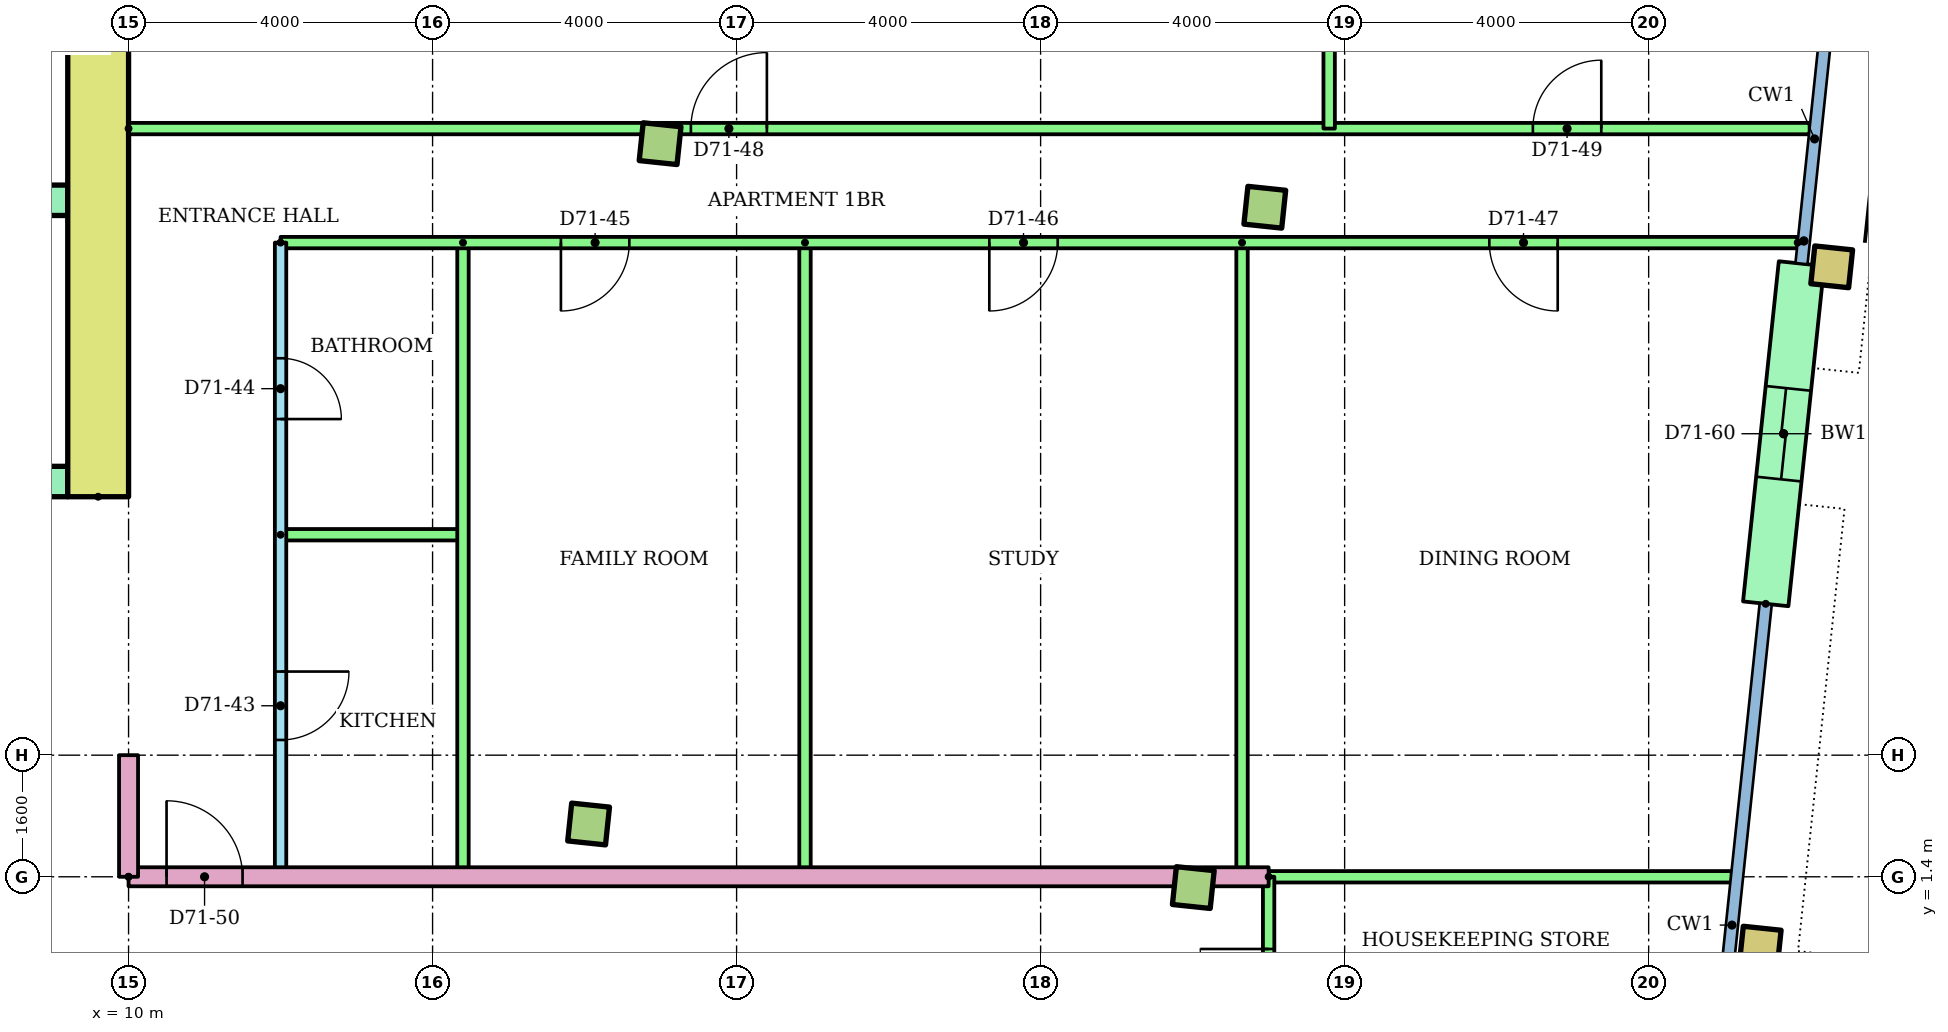
"""IFC4 building model, lengths in metres.
Left out: names, types, materials, properties, quantities, classifications, styles, units other than length and angle.
Written with IfcOpenShell. Run it as: python <this file> out.ifc"""

import sys

from ifc_helpers import new_model, si_unit, direction, frame, frame_2d, origin, origin_2d, place, context, subcontext, project, spatial, rectangle, hollow_rectangle, extrude, element, fill, save


model = new_model("IFC4")
c1 = context("Model", 3, precision=1e-05, world=origin(), true_north=direction((0.0, 1.0)))
c2 = subcontext(c1, "Body", "Model", "MODEL_VIEW")
j1 = project(units=[si_unit("LENGTHUNIT", "METRE"), si_unit("PLANEANGLEUNIT", "RADIAN")], contexts=[c1])
p1 = place(None, origin())
s1 = spatial("IfcSite", under=j1, at=p1, CompositionType="ELEMENT")
p2 = place(p1, origin())
s2 = spatial("IfcBuilding", under=s1, at=p2, CompositionType="ELEMENT")
p3 = place(p2, frame((0.0, 0.0, 272.3)))
s3 = spatial("IfcBuildingStorey", under=s2, at=p3, CompositionType="ELEMENT", Elevation=272.3)
for number, where, z_axis, x_axis in (
    (1, (16.053, 2.094, 0.0), (0.0, 0.0, 1.0), (0.995, -0.105, 0.0)),
    (2, (24.009, 1.258, 0.0), (0.0, 0.0, 1.0), (0.995, -0.105, 0.0)),
):
    element("IfcColumn", number, at=place(p3, frame(where, z_axis=z_axis, x_axis=x_axis)), inside=s3, PredefinedType="COLUMN", context=c2, shape_type="SweptSolid", body=[
        extrude(rectangle(XDim=0.5, YDim=0.5, at=origin_2d()), origin(), (0.0, 0.0, 1.0), 3.2),
    ])
p4 = place(p3, frame((31.468, 0.474, 0.0), z_axis=(0.0, 0.0, 1.0), x_axis=(0.994521895368, -0.104528463268, 0.0)))
e3 = element("IfcColumn", 3, at=p4, inside=s3, PredefinedType="COLUMN", context=c2, shape_type="SweptSolid", body=[
    extrude(hollow_rectangle(XDim=0.5, YDim=0.5, WallThickness=0.025, at=origin_2d()), origin(), (0.0, 0.0, 1.0), 3.2),
])
for number, where, z_axis, x_axis in (
    (4, (16.993, 11.045, 0.0), (0.0, 0.0, 1.0), (0.995, -0.105, 0.0)),
    (5, (24.95, 10.209, 0.0), (0.0, 0.0, 1.0), (0.995, -0.105, 0.0)),
):
    element("IfcColumn", number, at=place(p3, frame(where, z_axis=z_axis, x_axis=x_axis)), inside=s3, PredefinedType="COLUMN", context=c2, shape_type="SweptSolid", body=[
        extrude(rectangle(XDim=0.5, YDim=0.5, at=origin_2d()), origin(), (0.0, 0.0, 1.0), 3.2),
    ])
p5 = place(p3, frame((32.409, 9.425, 0.0), z_axis=(0.0, 0.0, 1.0), x_axis=(0.994521895368, -0.104528463268, 0.0)))
e6 = element("IfcColumn", 6, at=p5, inside=s3, PredefinedType="COLUMN", context=c2, shape_type="SweptSolid", body=[
    extrude(hollow_rectangle(XDim=0.5, YDim=0.5, WallThickness=0.025, at=origin_2d()), origin(), (0.0, 0.0, 1.0), 3.2),
])
p6 = place(p3, frame((31.54, 4.991, 0.0), z_axis=(0.0, 0.0, 1.0), x_axis=(0.104546400045, 0.994520009974, 0.0)))
e7 = element("IfcWall", 7, at=p6, inside=s3, PredefinedType="STANDARD", context=c2, shape_type="SweptSolid", body=[
    extrude(rectangle(XDim=4.5, YDim=0.6, at=frame_2d((2.25, 0.0))), origin(), (0.0, 0.0, 1.0), 2.92),
])
p7 = place(p6, frame((1.65, 0.0, 0.0)))
e8 = element("IfcOpeningElement", 8, at=p7, cuts=e7, PredefinedType="OPENING", context=c2, shape_type="SweptSolid", body=[
    extrude(rectangle(XDim=1.2, YDim=2.1, at=frame_2d((0.6, 1.05))), frame((0.0, 0.31, 0.0), z_axis=(0.0, -1.0, 0.0), x_axis=(1.0, 0.0, 0.0)), (0.0, 0.0, 1.0), 0.62),
])
p8 = place(p3, frame((9.6, 6.4, 0.0), z_axis=(0.0, 0.0, 1.0), x_axis=(0.0, 1.0, 0.0)))
e9 = element("IfcWall", 9, at=p8, inside=s3, PredefinedType="SHEAR", context=c2, shape_type="SweptSolid", body=[
    extrude(rectangle(XDim=13.6, YDim=0.8, at=frame_2d((6.8, 0.0))), origin(), (0.0, 0.0, 1.0), 2.92),
])
p9 = place(p3, frame((-9.2, 6.6, 0.0)))
e10 = element("IfcWall", 10, at=p9, inside=s3, PredefinedType="SHEAR", context=c2, shape_type="SweptSolid", body=[
    extrude(rectangle(XDim=18.4, YDim=0.4, at=frame_2d((9.2, 0.0))), origin(), (0.0, 0.0, 1.0), 2.92),
])
p10 = place(p9, frame((8.3, 0.0, 0.0)))
e11 = element("IfcOpeningElement", 11, at=p10, cuts=e10, PredefinedType="OPENING", context=c2, shape_type="SweptSolid", body=[
    extrude(rectangle(XDim=1.8, YDim=2.1, at=frame_2d((0.9, 1.05))), frame((0.0, 0.21, 0.0), z_axis=(0.0, -1.0, 0.0), x_axis=(1.0, 0.0, 0.0)), (0.0, 0.0, 1.0), 0.42),
])
p11 = place(p9, frame((3.8, 0.0, 0.0)))
e12 = element("IfcOpeningElement", 12, at=p11, cuts=e10, PredefinedType="OPENING", context=c2, shape_type="SweptSolid", body=[
    extrude(rectangle(XDim=1.8, YDim=2.1, at=frame_2d((0.9, 1.05))), frame((0.0, 0.21, 0.0), z_axis=(0.0, -1.0, 0.0), x_axis=(1.0, 0.0, 0.0)), (0.0, 0.0, 1.0), 0.42),
])
p12 = place(p9, frame((12.8, 0.0, 0.0)))
e13 = element("IfcOpeningElement", 13, at=p12, cuts=e10, PredefinedType="OPENING", context=c2, shape_type="SweptSolid", body=[
    extrude(rectangle(XDim=1.8, YDim=2.1, at=frame_2d((0.9, 1.05))), frame((0.0, 0.21, 0.0), z_axis=(0.0, -1.0, 0.0), x_axis=(1.0, 0.0, 0.0)), (0.0, 0.0, 1.0), 0.42),
])
p13 = place(p3, frame((1.2, 10.3, 0.0)))
e14 = element("IfcWall", 14, at=p13, inside=s3, PredefinedType="SHEAR", context=c2, shape_type="SweptSolid", body=[
    extrude(rectangle(XDim=8.0, YDim=0.4, at=frame_2d((4.0, 0.0))), origin(), (0.0, 0.0, 1.0), 2.92),
])
p14 = place(p13, frame((0.817, 0.0, 0.0)))
e15 = element("IfcOpeningElement", 15, at=p14, cuts=e14, PredefinedType="OPENING", context=c2, shape_type="SweptSolid", body=[
    extrude(rectangle(XDim=1.1, YDim=2.1, at=frame_2d((0.55, 1.05))), frame((0.0, 0.21, 0.0), z_axis=(0.0, -1.0, 0.0), x_axis=(1.0, 0.0, 0.0)), (0.0, 0.0, 1.0), 0.42),
])
p15 = place(p13, frame((3.55, 0.0, 0.0)))
e16 = element("IfcOpeningElement", 16, at=p15, cuts=e14, PredefinedType="OPENING", context=c2, shape_type="SweptSolid", body=[
    extrude(rectangle(XDim=1.1, YDim=2.1, at=frame_2d((0.55, 1.05))), frame((0.0, 0.21, 0.0), z_axis=(0.0, -1.0, 0.0), x_axis=(1.0, 0.0, 0.0)), (0.0, 0.0, 1.0), 0.42),
])
p16 = place(p13, frame((6.283, 0.0, 0.0)))
e17 = element("IfcOpeningElement", 17, at=p16, cuts=e14, PredefinedType="OPENING", context=c2, shape_type="SweptSolid", body=[
    extrude(rectangle(XDim=1.1, YDim=2.1, at=frame_2d((0.55, 1.05))), frame((0.0, 0.21, 0.0), z_axis=(0.0, -1.0, 0.0), x_axis=(1.0, 0.0, 0.0)), (0.0, 0.0, 1.0), 0.42),
])
p17 = place(p3, frame((12.0, 9.743, 0.0), z_axis=(0.0, 0.0, 1.0), x_axis=(0.0, -1.0, 0.0)))
e18 = element("IfcWall", 18, at=p17, inside=s3, PredefinedType="PARTITIONING", context=c2, shape_type="SweptSolid", body=[
    extrude(rectangle(XDim=8.344, YDim=0.15, at=frame_2d((4.172, 0.0))), origin(), (0.0, 0.0, 1.0), 2.4),
])
p18 = place(p17, frame((5.643, 0.0, 0.0)))
e19 = element("IfcOpeningElement", 19, at=p18, cuts=e18, PredefinedType="OPENING", context=c2, shape_type="SweptSolid", body=[
    extrude(rectangle(XDim=0.9, YDim=2.1, at=frame_2d((0.45, 1.05))), frame((0.0, 0.085, 0.0), z_axis=(0.0, -1.0, 0.0), x_axis=(1.0, 0.0, 0.0)), (0.0, 0.0, 1.0), 0.17),
])
p19 = place(p17, frame((1.522, 0.0, 0.0)))
e20 = element("IfcOpeningElement", 20, at=p19, cuts=e18, PredefinedType="OPENING", context=c2, shape_type="SweptSolid", body=[
    extrude(rectangle(XDim=0.8, YDim=2.1, at=frame_2d((0.4, 1.05))), frame((0.0, 0.085, 0.0), z_axis=(0.0, -1.0, 0.0), x_axis=(1.0, 0.0, 0.0)), (0.0, 0.0, 1.0), 0.17),
])
p20 = place(p3, frame((12.0, 5.9, 0.0)))
e21 = element("IfcWall", 21, at=p20, inside=s3, PredefinedType="PARTITIONING", context=c2, shape_type="SweptSolid", body=[
    extrude(rectangle(XDim=2.4, YDim=0.15, at=frame_2d((1.2, 0.0))), origin(), (0.0, 0.0, 1.0), 2.4),
])
for number, where, z_axis, x_axis in (
    (22, (14.4, 9.743, 0.0), (0.0, 0.0, 1.0), (0.0, -1.0, 0.0)),
    (23, (18.9, 9.743, 0.0), (0.0, 0.0, 1.0), (0.0, -1.0, 0.0)),
    (24, (24.65, 9.743, 0.0), (0.0, 0.0, 1.0), (0.0, -1.0, 0.0)),
):
    element("IfcWall", number, at=place(p3, frame(where, z_axis=z_axis, x_axis=x_axis)), inside=s3, PredefinedType="PARTITIONING", context=c2, shape_type="SweptSolid", body=[
        extrude(rectangle(XDim=8.344, YDim=0.15, at=frame_2d((4.172, 0.0))), origin(), (0.0, 0.0, 1.0), 2.4),
    ])
p21 = place(p3, frame((31.96, 9.743, 0.0), z_axis=(0.0, 0.0, 1.0), x_axis=(-1.0, 0.0, 0.0)))
e25 = element("IfcWall", 25, at=p21, inside=s3, PredefinedType="PARTITIONING", context=c2, shape_type="SweptSolid", body=[
    extrude(rectangle(XDim=19.96, YDim=0.15, at=frame_2d((9.98, 0.0))), origin(), (0.0, 0.0, 1.0), 2.4),
])
p22 = place(p21, frame((15.372, 0.0, 0.0)))
e26 = element("IfcOpeningElement", 26, at=p22, cuts=e25, PredefinedType="OPENING", context=c2, shape_type="SweptSolid", body=[
    extrude(rectangle(XDim=0.9, YDim=2.1, at=frame_2d((0.45, 1.05))), frame((0.0, 0.085, 0.0), z_axis=(0.0, -1.0, 0.0), x_axis=(1.0, 0.0, 0.0)), (0.0, 0.0, 1.0), 0.17),
])
p23 = place(p21, frame((9.735, 0.0, 0.0)))
e27 = element("IfcOpeningElement", 27, at=p23, cuts=e25, PredefinedType="OPENING", context=c2, shape_type="SweptSolid", body=[
    extrude(rectangle(XDim=0.9, YDim=2.1, at=frame_2d((0.45, 1.05))), frame((0.0, 0.085, 0.0), z_axis=(0.0, -1.0, 0.0), x_axis=(1.0, 0.0, 0.0)), (0.0, 0.0, 1.0), 0.17),
])
p24 = place(p21, frame((3.157, 0.0, 0.0)))
e28 = element("IfcOpeningElement", 28, at=p24, cuts=e25, PredefinedType="OPENING", context=c2, shape_type="SweptSolid", body=[
    extrude(rectangle(XDim=0.9, YDim=2.1, at=frame_2d((0.45, 1.05))), frame((0.0, 0.085, 0.0), z_axis=(0.0, -1.0, 0.0), x_axis=(1.0, 0.0, 0.0)), (0.0, 0.0, 1.0), 0.17),
])
p25 = place(p3, frame((10.0, 11.243, 0.0)))
e29 = element("IfcWall", 29, at=p25, inside=s3, PredefinedType="PARTITIONING", context=c2, shape_type="SweptSolid", body=[
    extrude(rectangle(XDim=22.118, YDim=0.15, at=frame_2d((11.059, 0.0))), origin(), (0.0, 0.0, 1.0), 2.4),
])
p26 = place(p25, frame((7.398, 0.0, 0.0)))
e30 = element("IfcOpeningElement", 30, at=p26, cuts=e29, PredefinedType="OPENING", context=c2, shape_type="SweptSolid", body=[
    extrude(rectangle(XDim=1.0, YDim=2.1, at=frame_2d((0.5, 1.05))), frame((0.0, 0.085, 0.0), z_axis=(0.0, -1.0, 0.0), x_axis=(1.0, 0.0, 0.0)), (0.0, 0.0, 1.0), 0.17),
])
p27 = place(p25, frame((18.477, 0.0, 0.0)))
e31 = element("IfcOpeningElement", 31, at=p27, cuts=e29, PredefinedType="OPENING", context=c2, shape_type="SweptSolid", body=[
    extrude(rectangle(XDim=0.9, YDim=2.1, at=frame_2d((0.45, 1.05))), frame((0.0, 0.085, 0.0), z_axis=(0.0, -1.0, 0.0), x_axis=(1.0, 0.0, 0.0)), (0.0, 0.0, 1.0), 0.17),
])
p28 = place(p3, frame((25.796, 18.185, 0.0), z_axis=(0.0, 0.0, 1.0), x_axis=(0.0, -1.0, 0.0)))
e32 = element("IfcWall", 32, at=p28, inside=s3, PredefinedType="PARTITIONING", context=c2, shape_type="SweptSolid", body=[
    extrude(rectangle(XDim=6.941, YDim=0.15, at=frame_2d((3.471, 0.0))), origin(), (0.0, 0.0, 1.0), 2.4),
])
p29 = place(p3, frame((10.0, 1.4, 0.0)))
e33 = element("IfcWall", 33, at=p29, inside=s3, PredefinedType="PARTITIONING", context=c2, shape_type="SweptSolid", body=[
    extrude(rectangle(XDim=15.0, YDim=0.25, at=frame_2d((7.5, 0.0))), origin(), (0.0, 0.0, 1.0), 2.4),
])
p30 = place(p29, frame((0.5, 0.0, 0.0)))
e34 = element("IfcOpeningElement", 34, at=p30, cuts=e33, PredefinedType="OPENING", context=c2, shape_type="SweptSolid", body=[
    extrude(rectangle(XDim=1.0, YDim=2.1, at=frame_2d((0.5, 1.05))), frame((0.0, 0.135, 0.0), z_axis=(0.0, -1.0, 0.0), x_axis=(1.0, 0.0, 0.0)), (0.0, 0.0, 1.0), 0.27),
])
p31 = place(p3, frame((25.0, 1.4, 0.0)))
e35 = element("IfcWall", 35, at=p31, inside=s3, PredefinedType="PARTITIONING", context=c2, shape_type="SweptSolid", body=[
    extrude(rectangle(XDim=6.093, YDim=0.15, at=frame_2d((3.046, 0.0))), origin(), (0.0, 0.0, 1.0), 2.4),
])
p32 = place(p3, frame((25.0, -1.4, 0.0), z_axis=(0.0, 0.0, 1.0), x_axis=(0.0, 1.0, 0.0)))
e36 = element("IfcWall", 36, at=p32, inside=s3, PredefinedType="PARTITIONING", context=c2, shape_type="SweptSolid", body=[
    extrude(rectangle(XDim=2.8, YDim=0.15, at=frame_2d((1.4, 0.0))), origin(), (0.0, 0.0, 1.0), 2.4),
])
p33 = place(p32, frame((0.95, 0.0, 0.0)))
e37 = element("IfcOpeningElement", 37, at=p33, cuts=e36, PredefinedType="OPENING", context=c2, shape_type="SweptSolid", body=[
    extrude(rectangle(XDim=0.9, YDim=2.1, at=frame_2d((0.45, 1.05))), frame((0.0, 0.085, 0.0), z_axis=(0.0, -1.0, 0.0), x_axis=(1.0, 0.0, 0.0)), (0.0, 0.0, 1.0), 0.17),
])
p34 = place(p3, frame((10.0, 1.4, 0.0), z_axis=(0.0, 0.0, 1.0), x_axis=(0.0, 1.0, 0.0)))
e38 = element("IfcWall", 38, at=p34, inside=s3, PredefinedType="PARTITIONING", context=c2, shape_type="SweptSolid", body=[
    extrude(rectangle(XDim=1.6, YDim=0.25, at=frame_2d((0.8, 0.0))), origin(), (0.0, 0.0, 1.0), 2.4),
])
p35 = place(p18, origin())
e39 = element("IfcDoor", 39, at=p35, inside=s3, OperationType="SINGLE_SWING_LEFT", PredefinedType="DOOR", context=c2, shape_type="SweptSolid", body=[
    extrude(rectangle(XDim=0.9, YDim=2.1, at=frame_2d((0.45, 1.05))), frame((0.0, 0.025, 0.0), z_axis=(0.0, -1.0, 0.0), x_axis=(1.0, 0.0, 0.0)), (0.0, 0.0, 1.0), 0.05),
])
fill(e19, e39)
p36 = place(p19, origin())
e40 = element("IfcDoor", 40, at=p36, inside=s3, OperationType="SINGLE_SWING_RIGHT", PredefinedType="DOOR", context=c2, shape_type="SweptSolid", body=[
    extrude(rectangle(XDim=0.8, YDim=2.1, at=frame_2d((0.4, 1.05))), frame((0.0, 0.025, 0.0), z_axis=(0.0, -1.0, 0.0), x_axis=(1.0, 0.0, 0.0)), (0.0, 0.0, 1.0), 0.05),
])
fill(e20, e40)
p37 = place(p22, origin())
e41 = element("IfcDoor", 41, at=p37, inside=s3, OperationType="SINGLE_SWING_RIGHT", PredefinedType="DOOR", context=c2, shape_type="SweptSolid", body=[
    extrude(rectangle(XDim=0.9, YDim=2.1, at=frame_2d((0.45, 1.05))), frame((0.0, 0.025, 0.0), z_axis=(0.0, -1.0, 0.0), x_axis=(1.0, 0.0, 0.0)), (0.0, 0.0, 1.0), 0.05),
])
fill(e26, e41)
p38 = place(p23, origin())
e42 = element("IfcDoor", 42, at=p38, inside=s3, OperationType="SINGLE_SWING_RIGHT", PredefinedType="DOOR", context=c2, shape_type="SweptSolid", body=[
    extrude(rectangle(XDim=0.9, YDim=2.1, at=frame_2d((0.45, 1.05))), frame((0.0, 0.025, 0.0), z_axis=(0.0, -1.0, 0.0), x_axis=(1.0, 0.0, 0.0)), (0.0, 0.0, 1.0), 0.05),
])
fill(e27, e42)
p39 = place(p24, origin())
e43 = element("IfcDoor", 43, at=p39, inside=s3, OperationType="SINGLE_SWING_LEFT", PredefinedType="DOOR", context=c2, shape_type="SweptSolid", body=[
    extrude(rectangle(XDim=0.9, YDim=2.1, at=frame_2d((0.45, 1.05))), frame((0.0, 0.025, 0.0), z_axis=(0.0, -1.0, 0.0), x_axis=(1.0, 0.0, 0.0)), (0.0, 0.0, 1.0), 0.05),
])
fill(e28, e43)
p40 = place(p26, origin())
e44 = element("IfcDoor", 44, at=p40, inside=s3, OperationType="SINGLE_SWING_RIGHT", PredefinedType="DOOR", context=c2, shape_type="SweptSolid", body=[
    extrude(rectangle(XDim=1.0, YDim=2.1, at=frame_2d((0.5, 1.05))), frame((0.0, 0.025, 0.0), z_axis=(0.0, -1.0, 0.0), x_axis=(1.0, 0.0, 0.0)), (0.0, 0.0, 1.0), 0.05),
])
fill(e30, e44)
p41 = place(p27, origin())
e45 = element("IfcDoor", 45, at=p41, inside=s3, OperationType="SINGLE_SWING_RIGHT", PredefinedType="DOOR", context=c2, shape_type="SweptSolid", body=[
    extrude(rectangle(XDim=0.9, YDim=2.1, at=frame_2d((0.45, 1.05))), frame((0.0, 0.025, 0.0), z_axis=(0.0, -1.0, 0.0), x_axis=(1.0, 0.0, 0.0)), (0.0, 0.0, 1.0), 0.05),
])
fill(e31, e45)
p42 = place(p30, origin())
e46 = element("IfcDoor", 46, at=p42, inside=s3, OperationType="SINGLE_SWING_LEFT", PredefinedType="DOOR", context=c2, shape_type="SweptSolid", body=[
    extrude(rectangle(XDim=1.0, YDim=2.1, at=frame_2d((0.5, 1.05))), frame((0.0, 0.025, 0.0), z_axis=(0.0, -1.0, 0.0), x_axis=(1.0, 0.0, 0.0)), (0.0, 0.0, 1.0), 0.05),
])
fill(e34, e46)
p43 = place(p33, origin())
e47 = element("IfcDoor", 47, at=p43, inside=s3, OperationType="SINGLE_SWING_RIGHT", PredefinedType="DOOR", context=c2, shape_type="SweptSolid", body=[
    extrude(rectangle(XDim=0.9, YDim=2.1, at=frame_2d((0.45, 1.05))), frame((0.0, 0.025, 0.0), z_axis=(0.0, -1.0, 0.0), x_axis=(1.0, 0.0, 0.0)), (0.0, 0.0, 1.0), 0.05),
])
fill(e37, e47)
p44 = place(p7, origin())
e48 = element("IfcDoor", 48, at=p44, inside=s3, OperationType="SLIDING_TO_LEFT", PredefinedType="DOOR", context=c2, shape_type="SweptSolid", body=[
    extrude(rectangle(XDim=1.2, YDim=2.1, at=frame_2d((0.6, 1.05))), frame((0.0, 0.025, 0.0), z_axis=(0.0, -1.0, 0.0), x_axis=(1.0, 0.0, 0.0)), (0.0, 0.0, 1.0), 0.05),
])
fill(e8, e48)
save(model, sys.argv[1])
